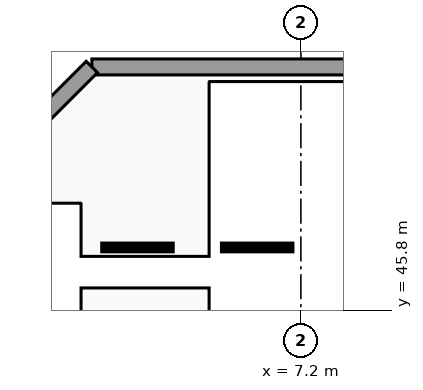
"""IFC4 building model, lengths in metres.
Left out: names, types, materials, properties, quantities, classifications, styles, units other than length and angle.
Written with IfcOpenShell. Run it as: python <this file> out.ifc"""

import sys

from ifc_helpers import new_model, si_unit, direction, frame, frame_2d, origin, place, context, subcontext, project, spatial, rectangle, extrude, element, save


model = new_model("IFC4")
c1 = context("Model", 3, precision=1e-05, world=origin(), true_north=direction((0.0, 1.0)))
c2 = subcontext(c1, "Body", "Model", "MODEL_VIEW")
j1 = project(units=[si_unit("LENGTHUNIT", "METRE"), si_unit("PLANEANGLEUNIT", "RADIAN")], contexts=[c1])
p1 = place(None, origin())
s1 = spatial("IfcSite", under=j1, at=p1, CompositionType="ELEMENT")
p2 = place(p1, origin())
s2 = spatial("IfcBuilding", under=s1, at=p2, CompositionType="ELEMENT")
p3 = place(p2, frame((0.0, 0.0, -8.16)))
s3 = spatial("IfcBuildingStorey", under=s2, at=p3, CompositionType="ELEMENT", Elevation=-8.16)
p4 = place(p3, frame((1.7, 52.2, 0.0), z_axis=(0.0, 0.0, 1.0), x_axis=(1.0, 0.0, 0.0)))
e1 = element("IfcWall", 1, at=p4, inside=s3, PredefinedType="SOLIDWALL", context=c2, shape_type="SweptSolid", body=[
    extrude(rectangle(XDim=73.4, YDim=0.42, at=frame_2d((36.7, 0.0))), origin(), (0.0, 0.0, 1.0), 3.76),
])
p5 = place(p3, frame((-2.5, 48.0, 0.0), z_axis=(0.0, 0.0, 1.0), x_axis=(0.707106781187, 0.707106781187, 0.0)))
e2 = element("IfcWall", 2, at=p5, inside=s3, PredefinedType="SOLIDWALL", context=c2, shape_type="SweptSolid", body=[
    extrude(rectangle(XDim=5.94, YDim=0.42, at=frame_2d((2.97, 0.0))), origin(), (0.0, 0.0, 1.0), 3.76),
])
save(model, sys.argv[1])
